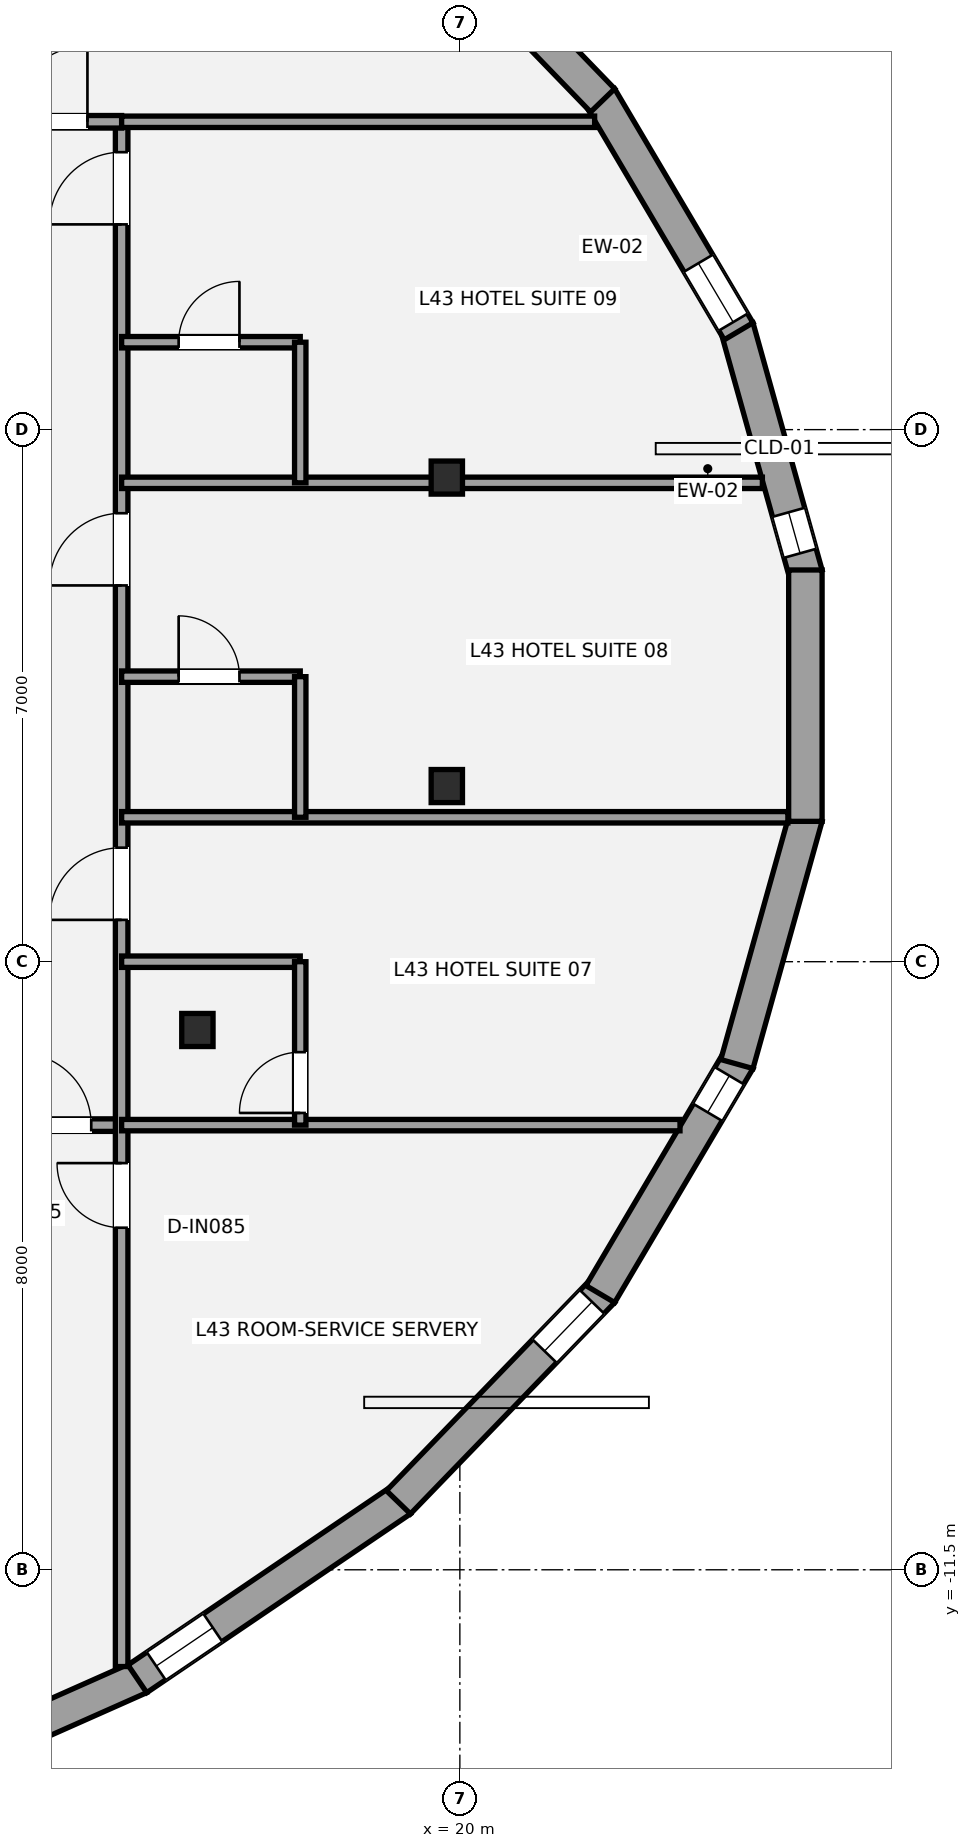
"""IFC4 building model, lengths in metres.
Left out: names, types, materials, properties, quantities, classifications, styles, units other than length and angle.
Written with IfcOpenShell. Run it as: python <this file> out.ifc"""

import sys

from ifc_helpers import new_model, si_unit, direction, frame, frame_2d, origin, origin_2d, place, context, subcontext, project, spatial, rectangle, i_section, extrude, element, fill, save


model = new_model("IFC4")
c1 = context("Model", 3, precision=1e-05, world=origin(), true_north=direction((0.0, 1.0)))
c2 = subcontext(c1, "Body", "Model", "MODEL_VIEW")
j1 = project(units=[si_unit("LENGTHUNIT", "METRE"), si_unit("PLANEANGLEUNIT", "RADIAN")], contexts=[c1])
p1 = place(None, origin())
s1 = spatial("IfcSite", under=j1, at=p1, CompositionType="ELEMENT")
p2 = place(p1, origin())
s2 = spatial("IfcBuilding", under=s1, at=p2, CompositionType="ELEMENT")
p3 = place(p2, frame((0.0, 0.0, 159.8)))
s3 = spatial("IfcBuildingStorey", under=s2, at=p3, CompositionType="ELEMENT", Elevation=159.8)
for number, where, z_axis, x_axis in (
    (1, (19.828, 2.869, 0.0), (0.0, 0.0, 1.0), (1.0, 0.0, 0.0)),
    (2, (16.547, -4.398, 0.0), (0.0, 0.0, 1.0), (1.0, 0.0, 0.0)),
    (3, (19.828, -1.189, 0.0), (0.0, 0.0, 1.0), (1.0, 0.0, 0.0)),
):
    element("IfcColumn", number, at=place(p3, frame(where, z_axis=z_axis, x_axis=x_axis)), inside=s3, PredefinedType="COLUMN", context=c2, shape_type="SweptSolid", body=[
        extrude(i_section(OverallWidth=0.412, OverallDepth=0.435, WebThickness=0.036, FlangeThickness=0.057, at=origin_2d()), origin(), (0.0, 0.0, 1.0), 3.2),
    ])
p4 = place(p3, frame((23.645, 4.846, 0.0), z_axis=(0.0, 0.0, 1.0), x_axis=(0.269235699479, -0.963074315993, 0.0)))
e4 = element("IfcWall", 4, at=p4, inside=s3, PredefinedType="STANDARD", context=c2, shape_type="SweptSolid", body=[
    extrude(rectangle(XDim=3.377, YDim=0.44, at=frame_2d((1.688, 0.0))), origin(), (0.0, 0.0, 1.0), 2.315),
])
p5 = place(p4, frame((2.528, 0.0, 0.58)))
e5 = element("IfcOpeningElement", 5, at=p5, cuts=e4, PredefinedType="OPENING", context=c2, shape_type="SweptSolid", body=[
    extrude(rectangle(XDim=0.56, YDim=1.15, at=frame_2d((0.28, 0.575))), frame((0.0, 0.23, 0.0), z_axis=(0.0, -1.0, 0.0), x_axis=(1.0, 0.0, 0.0)), (0.0, 0.0, 1.0), 0.46),
])
p6 = place(p3, frame((21.847, 7.873, 0.0), z_axis=(0.0, 0.0, 1.0), x_axis=(0.508883387051, -0.860835465338, 0.0)))
e6 = element("IfcWall", 6, at=p6, inside=s3, PredefinedType="STANDARD", context=c2, shape_type="SweptSolid", body=[
    extrude(rectangle(XDim=3.577, YDim=0.44, at=frame_2d((1.788, 0.0))), origin(), (0.0, 0.0, 1.0), 2.315),
])
p7 = place(p6, frame((2.537, 0.0, 0.42)))
e7 = element("IfcOpeningElement", 7, at=p7, cuts=e6, PredefinedType="OPENING", context=c2, shape_type="SweptSolid", body=[
    extrude(rectangle(XDim=0.9, YDim=1.35, at=frame_2d((0.45, 0.675))), frame((0.0, 0.23, 0.0), z_axis=(0.0, -1.0, 0.0), x_axis=(1.0, 0.0, 0.0)), (0.0, 0.0, 1.0), 0.46),
])
p8 = place(p3, frame((19.192, 10.612, 0.0), z_axis=(0.0, 0.0, 1.0), x_axis=(0.694975307772, -0.719033602544, 0.0)))
e8 = element("IfcWall", 8, at=p8, inside=s3, PredefinedType="STANDARD", context=c2, shape_type="SweptSolid", body=[
    extrude(rectangle(XDim=3.866, YDim=0.44, at=frame_2d((1.933, 0.0))), origin(), (0.0, 0.0, 1.0), 2.315),
])
p9 = place(p8, frame((0.25, 0.0, 0.42)))
e9 = element("IfcOpeningElement", 9, at=p9, cuts=e8, PredefinedType="OPENING", context=c2, shape_type="SweptSolid", body=[
    extrude(rectangle(XDim=0.9, YDim=1.35, at=frame_2d((0.45, 0.675))), frame((0.0, 0.23, 0.0), z_axis=(0.0, -1.0, 0.0), x_axis=(1.0, 0.0, 0.0)), (0.0, 0.0, 1.0), 0.46),
])
p10 = place(p3, frame((15.791, -12.916, 0.0), z_axis=(0.0, 0.0, 1.0), x_axis=(-0.913907994914, -0.405921392431, 0.0)))
e10 = element("IfcWall", 10, at=p10, inside=s3, PredefinedType="STANDARD", context=c2, shape_type="SweptSolid", body=[
    extrude(rectangle(XDim=4.487, YDim=0.44, at=frame_2d((2.244, 0.0))), origin(), (0.0, 0.0, 1.0), 2.315),
])
p11 = place(p10, frame((3.188, 0.0, 0.58)))
e11 = element("IfcOpeningElement", 11, at=p11, cuts=e10, PredefinedType="OPENING", context=c2, shape_type="SweptSolid", body=[
    extrude(rectangle(XDim=0.9, YDim=1.35, at=frame_2d((0.45, 0.675))), frame((0.0, 0.23, 0.0), z_axis=(0.0, -1.0, 0.0), x_axis=(1.0, 0.0, 0.0)), (0.0, 0.0, 1.0), 0.46),
])
p12 = place(p3, frame((19.227, -10.583, 0.0), z_axis=(0.0, 0.0, 1.0), x_axis=(-0.827760762475, -0.561081206338, 0.0)))
e12 = element("IfcWall", 12, at=p12, inside=s3, PredefinedType="STANDARD", context=c2, shape_type="SweptSolid", body=[
    extrude(rectangle(XDim=4.192, YDim=0.44, at=frame_2d((2.096, 0.0))), origin(), (0.0, 0.0, 1.0), 2.315),
])
p13 = place(p12, frame((2.992, 0.0, 0.58)))
e13 = element("IfcOpeningElement", 13, at=p13, cuts=e12, PredefinedType="OPENING", context=c2, shape_type="SweptSolid", body=[
    extrude(rectangle(XDim=0.9, YDim=1.35, at=frame_2d((0.45, 0.675))), frame((0.0, 0.23, 0.0), z_axis=(0.0, -1.0, 0.0), x_axis=(1.0, 0.0, 0.0)), (0.0, 0.0, 1.0), 0.46),
])
p14 = place(p3, frame((21.879, -7.832, 0.0), z_axis=(0.0, 0.0, 1.0), x_axis=(-0.694975307772, -0.719033602544, 0.0)))
e14 = element("IfcWall", 14, at=p14, inside=s3, PredefinedType="STANDARD", context=c2, shape_type="SweptSolid", body=[
    extrude(rectangle(XDim=3.866, YDim=0.44, at=frame_2d((1.933, 0.0))), origin(), (0.0, 0.0, 1.0), 2.315),
])
p15 = place(p14, frame((0.2, 0.0, 0.58)))
e15 = element("IfcOpeningElement", 15, at=p15, cuts=e14, PredefinedType="OPENING", context=c2, shape_type="SweptSolid", body=[
    extrude(rectangle(XDim=0.9, YDim=1.35, at=frame_2d((0.45, 0.675))), frame((0.0, 0.23, 0.0), z_axis=(0.0, -1.0, 0.0), x_axis=(1.0, 0.0, 0.0)), (0.0, 0.0, 1.0), 0.46),
])
p16 = place(p3, frame((23.667, -4.794, 0.0), z_axis=(0.0, 0.0, 1.0), x_axis=(-0.508883387051, -0.860835465338, 0.0)))
e16 = element("IfcWall", 16, at=p16, inside=s3, PredefinedType="STANDARD", context=c2, shape_type="SweptSolid", body=[
    extrude(rectangle(XDim=3.577, YDim=0.44, at=frame_2d((1.788, 0.0))), origin(), (0.0, 0.0, 1.0), 2.315),
])
p17 = place(p16, frame((0.24, 0.0, 0.58)))
e17 = element("IfcOpeningElement", 17, at=p17, cuts=e16, PredefinedType="OPENING", context=c2, shape_type="SweptSolid", body=[
    extrude(rectangle(XDim=0.56, YDim=1.15, at=frame_2d((0.28, 0.575))), frame((0.0, 0.23, 0.0), z_axis=(0.0, -1.0, 0.0), x_axis=(1.0, 0.0, 0.0)), (0.0, 0.0, 1.0), 0.46),
])
p18 = place(p3, frame((24.554, -1.594, 0.0), z_axis=(0.0, 0.0, 1.0), x_axis=(-0.269235699479, -0.963074315993, 0.0)))
e18 = element("IfcWall", 18, at=p18, inside=s3, PredefinedType="STANDARD", context=c2, shape_type="SweptSolid", body=[
    extrude(rectangle(XDim=3.377, YDim=0.44, at=frame_2d((1.688, 0.0))), origin(), (0.0, 0.0, 1.0), 2.315),
])
p19 = place(p3, frame((24.546, 1.654, 0.0), z_axis=(0.0, 0.0, 1.0), x_axis=(0.0, -1.0, 0.0)))
e19 = element("IfcWall", 19, at=p19, inside=s3, PredefinedType="STANDARD", context=c2, shape_type="SweptSolid", body=[
    extrude(rectangle(XDim=3.307, YDim=0.44, at=frame_2d((1.654, 0.0))), origin(), (0.0, 0.0, 1.0), 2.315),
])
p20 = place(p3, frame((-15.95, -5.65, 0.0), z_axis=(0.0, 0.0, 1.0), x_axis=(1.0, 0.0, 0.0)))
e20 = element("IfcWall", 20, at=p20, inside=s3, PredefinedType="PARTITIONING", context=c2, shape_type="SweptSolid", body=[
    extrude(rectangle(XDim=31.5, YDim=0.165, at=frame_2d((15.75, 0.0))), origin(), (0.0, 0.0, 1.0), 2.398),
])
p21 = place(p20, frame((4.8, 0.0, 0.0)))
e21 = element("IfcOpeningElement", 21, at=p21, cuts=e20, PredefinedType="OPENING", context=c2, shape_type="SweptSolid", body=[
    extrude(rectangle(XDim=0.95, YDim=2.15, at=frame_2d((0.475, 1.075))), frame((0.0, 0.093, 0.0), z_axis=(0.0, -1.0, 0.0), x_axis=(1.0, 0.0, 0.0)), (0.0, 0.0, 1.0), 0.185),
])
p22 = place(p20, frame((12.8, 0.0, 0.0)))
e22 = element("IfcOpeningElement", 22, at=p22, cuts=e20, PredefinedType="OPENING", context=c2, shape_type="SweptSolid", body=[
    extrude(rectangle(XDim=0.95, YDim=2.15, at=frame_2d((0.475, 1.075))), frame((0.0, 0.093, 0.0), z_axis=(0.0, -1.0, 0.0), x_axis=(1.0, 0.0, 0.0)), (0.0, 0.0, 1.0), 0.185),
])
p23 = place(p20, frame((20.8, 0.0, 0.0)))
e23 = element("IfcOpeningElement", 23, at=p23, cuts=e20, PredefinedType="OPENING", context=c2, shape_type="SweptSolid", body=[
    extrude(rectangle(XDim=0.95, YDim=2.15, at=frame_2d((0.475, 1.075))), frame((0.0, 0.093, 0.0), z_axis=(0.0, -1.0, 0.0), x_axis=(1.0, 0.0, 0.0)), (0.0, 0.0, 1.0), 0.185),
])
p24 = place(p20, frame((30.15, 0.0, 0.0)))
e24 = element("IfcOpeningElement", 24, at=p24, cuts=e20, PredefinedType="OPENING", context=c2, shape_type="SweptSolid", body=[
    extrude(rectangle(XDim=0.95, YDim=2.15, at=frame_2d((0.475, 1.075))), frame((0.0, 0.093, 0.0), z_axis=(0.0, -1.0, 0.0), x_axis=(1.0, 0.0, 0.0)), (0.0, 0.0, 1.0), 0.185),
])
p25 = place(p3, frame((15.55, -12.773, 0.0), z_axis=(0.0, 0.0, 1.0), x_axis=(0.0, 1.0, 0.0)))
e25 = element("IfcWall", 25, at=p25, inside=s3, PredefinedType="PARTITIONING", context=c2, shape_type="SweptSolid", body=[
    extrude(rectangle(XDim=20.323, YDim=0.165, at=frame_2d((10.162, 0.0))), origin(), (0.0, 0.0, 1.0), 2.473),
])
p26 = place(p25, frame((5.773, 0.0, 0.0)))
e26 = element("IfcOpeningElement", 26, at=p26, cuts=e25, PredefinedType="OPENING", context=c2, shape_type="SweptSolid", body=[
    extrude(rectangle(XDim=0.85, YDim=2.1, at=frame_2d((0.425, 1.05))), frame((0.0, 0.093, 0.0), z_axis=(0.0, -1.0, 0.0), x_axis=(1.0, 0.0, 0.0)), (0.0, 0.0, 1.0), 0.185),
])
p27 = place(p25, frame((9.823, 0.0, 0.0)))
e27 = element("IfcOpeningElement", 27, at=p27, cuts=e25, PredefinedType="OPENING", context=c2, shape_type="SweptSolid", body=[
    extrude(rectangle(XDim=0.95, YDim=2.15, at=frame_2d((0.475, 1.075))), frame((0.0, 0.093, 0.0), z_axis=(0.0, -1.0, 0.0), x_axis=(1.0, 0.0, 0.0)), (0.0, 0.0, 1.0), 0.185),
])
p28 = place(p25, frame((14.223, 0.0, 0.0)))
e28 = element("IfcOpeningElement", 28, at=p28, cuts=e25, PredefinedType="OPENING", context=c2, shape_type="SweptSolid", body=[
    extrude(rectangle(XDim=0.95, YDim=2.15, at=frame_2d((0.475, 1.075))), frame((0.0, 0.093, 0.0), z_axis=(0.0, -1.0, 0.0), x_axis=(1.0, 0.0, 0.0)), (0.0, 0.0, 1.0), 0.185),
])
p29 = place(p25, frame((18.973, 0.0, 0.0)))
e29 = element("IfcOpeningElement", 29, at=p29, cuts=e25, PredefinedType="OPENING", context=c2, shape_type="SweptSolid", body=[
    extrude(rectangle(XDim=0.95, YDim=2.15, at=frame_2d((0.475, 1.075))), frame((0.0, 0.093, 0.0), z_axis=(0.0, -1.0, 0.0), x_axis=(1.0, 0.0, 0.0)), (0.0, 0.0, 1.0), 0.185),
])
p30 = place(p3, frame((13.8, 7.55, 0.0), z_axis=(0.0, 0.0, 1.0), x_axis=(1.0, 0.0, 0.0)))
e30 = element("IfcWall", 30, at=p30, inside=s3, PredefinedType="PARTITIONING", context=c2, shape_type="SweptSolid", body=[
    extrude(rectangle(XDim=1.75, YDim=0.165, at=frame_2d((0.875, 0.0))), origin(), (0.0, 0.0, 1.0), 2.473),
])
p31 = place(p30, frame((0.3, 0.0, 0.0)))
e31 = element("IfcOpeningElement", 31, at=p31, cuts=e30, PredefinedType="OPENING", context=c2, shape_type="SweptSolid", body=[
    extrude(rectangle(XDim=1.0, YDim=2.15, at=frame_2d((0.5, 1.075))), frame((0.0, 0.093, 0.0), z_axis=(0.0, -1.0, 0.0), x_axis=(1.0, 0.0, 0.0)), (0.0, 0.0, 1.0), 0.185),
])
p32 = place(p3, frame((15.55, 7.55, 0.0), z_axis=(0.0, 0.0, 1.0), x_axis=(1.0, 0.0, 0.0)))
e32 = element("IfcWall", 32, at=p32, inside=s3, PredefinedType="PLUMBINGWALL", context=c2, shape_type="SweptSolid", body=[
    extrude(rectangle(XDim=6.223, YDim=0.15, at=frame_2d((3.112, 0.0))), origin(), (0.0, 0.0, 1.0), 2.473),
])
p33 = place(p3, frame((15.55, -5.65, 0.0), z_axis=(0.0, 0.0, 1.0), x_axis=(1.0, 0.0, 0.0)))
e33 = element("IfcWall", 33, at=p33, inside=s3, PredefinedType="PLUMBINGWALL", context=c2, shape_type="SweptSolid", body=[
    extrude(rectangle(XDim=7.346, YDim=0.15, at=frame_2d((3.673, 0.0))), origin(), (0.0, 0.0, 1.0), 2.473),
])
p34 = place(p3, frame((15.55, -1.6, 0.0), z_axis=(0.0, 0.0, 1.0), x_axis=(1.0, 0.0, 0.0)))
e34 = element("IfcWall", 34, at=p34, inside=s3, PredefinedType="PLUMBINGWALL", context=c2, shape_type="SweptSolid", body=[
    extrude(rectangle(XDim=8.766, YDim=0.15, at=frame_2d((4.383, 0.0))), origin(), (0.0, 0.0, 1.0), 2.398),
])
p35 = place(p3, frame((15.55, 2.8, 0.0), z_axis=(0.0, 0.0, 1.0), x_axis=(1.0, 0.0, 0.0)))
e35 = element("IfcWall", 35, at=p35, inside=s3, PredefinedType="PLUMBINGWALL", context=c2, shape_type="SweptSolid", body=[
    extrude(rectangle(XDim=8.43, YDim=0.15, at=frame_2d((4.215, 0.0))), origin(), (0.0, 0.0, 1.0), 2.473),
])
p36 = place(p3, frame((15.55, -3.5, 0.0), z_axis=(0.0, 0.0, 1.0), x_axis=(1.0, 0.0, 0.0)))
e36 = element("IfcWall", 36, at=p36, inside=s3, PredefinedType="PLUMBINGWALL", context=c2, shape_type="SweptSolid", body=[
    extrude(rectangle(XDim=2.35, YDim=0.15, at=frame_2d((1.175, 0.0))), origin(), (0.0, 0.0, 1.0), 2.398),
])
p37 = place(p3, frame((17.9, -5.65, 0.0), z_axis=(0.0, 0.0, 1.0), x_axis=(0.0, 1.0, 0.0)))
e37 = element("IfcWall", 37, at=p37, inside=s3, PredefinedType="PLUMBINGWALL", context=c2, shape_type="SweptSolid", body=[
    extrude(rectangle(XDim=2.15, YDim=0.15, at=frame_2d((1.075, 0.0))), origin(), (0.0, 0.0, 1.0), 3.02),
])
p38 = place(p37, frame((0.16, 0.0, 0.0)))
e38 = element("IfcOpeningElement", 38, at=p38, cuts=e37, PredefinedType="OPENING", context=c2, shape_type="SweptSolid", body=[
    extrude(rectangle(XDim=0.8, YDim=2.1, at=frame_2d((0.4, 1.05))), frame((0.0, 0.085, 0.0), z_axis=(0.0, -1.0, 0.0), x_axis=(1.0, 0.0, 0.0)), (0.0, 0.0, 1.0), 0.17),
])
p39 = place(p3, frame((15.55, 0.25, 0.0), z_axis=(0.0, 0.0, 1.0), x_axis=(1.0, 0.0, 0.0)))
e39 = element("IfcWall", 39, at=p39, inside=s3, PredefinedType="PLUMBINGWALL", context=c2, shape_type="SweptSolid", body=[
    extrude(rectangle(XDim=2.35, YDim=0.15, at=frame_2d((1.175, 0.0))), origin(), (0.0, 0.0, 1.0), 2.473),
])
p40 = place(p39, frame((0.75, 0.0, 0.0)))
e40 = element("IfcOpeningElement", 40, at=p40, cuts=e39, PredefinedType="OPENING", context=c2, shape_type="SweptSolid", body=[
    extrude(rectangle(XDim=0.8, YDim=2.1, at=frame_2d((0.4, 1.05))), frame((0.0, 0.085, 0.0), z_axis=(0.0, -1.0, 0.0), x_axis=(1.0, 0.0, 0.0)), (0.0, 0.0, 1.0), 0.17),
])
p41 = place(p3, frame((17.9, -1.6, 0.0), z_axis=(0.0, 0.0, 1.0), x_axis=(0.0, 1.0, 0.0)))
e41 = element("IfcWall", 41, at=p41, inside=s3, PredefinedType="PLUMBINGWALL", context=c2, shape_type="SweptSolid", body=[
    extrude(rectangle(XDim=1.85, YDim=0.15, at=frame_2d((0.925, 0.0))), origin(), (0.0, 0.0, 1.0), 3.02),
])
p42 = place(p3, frame((15.55, 4.65, 0.0), z_axis=(0.0, 0.0, 1.0), x_axis=(1.0, 0.0, 0.0)))
e42 = element("IfcWall", 42, at=p42, inside=s3, PredefinedType="PLUMBINGWALL", context=c2, shape_type="SweptSolid", body=[
    extrude(rectangle(XDim=2.35, YDim=0.15, at=frame_2d((1.175, 0.0))), origin(), (0.0, 0.0, 1.0), 2.473),
])
p43 = place(p42, frame((0.75, 0.0, 0.0)))
e43 = element("IfcOpeningElement", 43, at=p43, cuts=e42, PredefinedType="OPENING", context=c2, shape_type="SweptSolid", body=[
    extrude(rectangle(XDim=0.8, YDim=2.1, at=frame_2d((0.4, 1.05))), frame((0.0, 0.085, 0.0), z_axis=(0.0, -1.0, 0.0), x_axis=(1.0, 0.0, 0.0)), (0.0, 0.0, 1.0), 0.17),
])
p44 = place(p3, frame((17.9, 2.8, 0.0), z_axis=(0.0, 0.0, 1.0), x_axis=(0.0, 1.0, 0.0)))
e44 = element("IfcWall", 44, at=p44, inside=s3, PredefinedType="PLUMBINGWALL", context=c2, shape_type="SweptSolid", body=[
    extrude(rectangle(XDim=1.85, YDim=0.15, at=frame_2d((0.925, 0.0))), origin(), (0.0, 0.0, 1.0), 2.473),
])
p45 = place(p13, origin())
e45 = element("IfcWindow", 45, at=p45, inside=s3, PartitioningType="SINGLE_PANEL", PredefinedType="WINDOW", context=c2, shape_type="SweptSolid", body=[
    extrude(rectangle(XDim=0.9, YDim=1.35, at=frame_2d((0.45, 0.675))), frame((0.0, -0.01, 0.0), z_axis=(0.0, -1.0, 0.0), x_axis=(1.0, 0.0, 0.0)), (0.0, 0.0, 1.0), 0.06),
])
fill(e13, e45)
p46 = place(p15, origin())
e46 = element("IfcWindow", 46, at=p46, inside=s3, PartitioningType="SINGLE_PANEL", PredefinedType="WINDOW", context=c2, shape_type="SweptSolid", body=[
    extrude(rectangle(XDim=0.9, YDim=1.35, at=frame_2d((0.45, 0.675))), frame((0.0, -0.01, 0.0), z_axis=(0.0, -1.0, 0.0), x_axis=(1.0, 0.0, 0.0)), (0.0, 0.0, 1.0), 0.06),
])
fill(e15, e46)
p47 = place(p17, origin())
e47 = element("IfcWindow", 47, at=p47, inside=s3, PartitioningType="SINGLE_PANEL", PredefinedType="WINDOW", context=c2, shape_type="SweptSolid", body=[
    extrude(rectangle(XDim=0.56, YDim=1.15, at=frame_2d((0.28, 0.575))), frame((0.0, -0.01, 0.0), z_axis=(0.0, -1.0, 0.0), x_axis=(1.0, 0.0, 0.0)), (0.0, 0.0, 1.0), 0.06),
])
fill(e17, e47)
p48 = place(p5, origin())
e48 = element("IfcWindow", 48, at=p48, inside=s3, PartitioningType="SINGLE_PANEL", PredefinedType="WINDOW", context=c2, shape_type="SweptSolid", body=[
    extrude(rectangle(XDim=0.56, YDim=1.15, at=frame_2d((0.28, 0.575))), frame((0.0, -0.01, 0.0), z_axis=(0.0, -1.0, 0.0), x_axis=(1.0, 0.0, 0.0)), (0.0, 0.0, 1.0), 0.06),
])
fill(e5, e48)
p49 = place(p7, origin())
e49 = element("IfcWindow", 49, at=p49, inside=s3, PartitioningType="SINGLE_PANEL", PredefinedType="WINDOW", context=c2, shape_type="SweptSolid", body=[
    extrude(rectangle(XDim=0.9, YDim=1.35, at=frame_2d((0.45, 0.675))), frame((0.0, -0.01, 0.0), z_axis=(0.0, -1.0, 0.0), x_axis=(1.0, 0.0, 0.0)), (0.0, 0.0, 1.0), 0.06),
])
fill(e7, e49)
p50 = place(p31, origin())
e50 = element("IfcDoor", 50, at=p50, inside=s3, OperationType="SINGLE_SWING_RIGHT", PredefinedType="DOOR", context=c2, shape_type="SweptSolid", body=[
    extrude(rectangle(XDim=1.0, YDim=2.15, at=frame_2d((0.5, 1.075))), frame((0.0, 0.025, 0.0), z_axis=(0.0, -1.0, 0.0), x_axis=(1.0, 0.0, 0.0)), (0.0, 0.0, 1.0), 0.05),
])
fill(e31, e50)
p51 = place(p26, origin())
e51 = element("IfcDoor", 51, at=p51, inside=s3, OperationType="SINGLE_SWING_RIGHT", PredefinedType="DOOR", context=c2, shape_type="SweptSolid", body=[
    extrude(rectangle(XDim=0.85, YDim=2.1, at=frame_2d((0.425, 1.05))), frame((0.0, 0.025, 0.0), z_axis=(0.0, -1.0, 0.0), x_axis=(1.0, 0.0, 0.0)), (0.0, 0.0, 1.0), 0.05),
])
fill(e26, e51)
p52 = place(p24, origin())
e52 = element("IfcDoor", 52, at=p52, inside=s3, OperationType="SINGLE_SWING_LEFT", PredefinedType="DOOR", context=c2, shape_type="SweptSolid", body=[
    extrude(rectangle(XDim=0.95, YDim=2.15, at=frame_2d((0.475, 1.075))), frame((0.0, 0.025, 0.0), z_axis=(0.0, -1.0, 0.0), x_axis=(1.0, 0.0, 0.0)), (0.0, 0.0, 1.0), 0.05),
])
fill(e24, e52)
p53 = place(p27, origin())
e53 = element("IfcDoor", 53, at=p53, inside=s3, OperationType="SINGLE_SWING_LEFT", PredefinedType="DOOR", context=c2, shape_type="SweptSolid", body=[
    extrude(rectangle(XDim=0.95, YDim=2.15, at=frame_2d((0.475, 1.075))), frame((0.0, 0.025, 0.0), z_axis=(0.0, -1.0, 0.0), x_axis=(1.0, 0.0, 0.0)), (0.0, 0.0, 1.0), 0.05),
])
fill(e27, e53)
p54 = place(p38, origin())
e54 = element("IfcDoor", 54, at=p54, inside=s3, OperationType="SINGLE_SWING_LEFT", PredefinedType="DOOR", context=c2, shape_type="SweptSolid", body=[
    extrude(rectangle(XDim=0.8, YDim=2.1, at=frame_2d((0.4, 1.05))), frame((0.0, 0.025, 0.0), z_axis=(0.0, -1.0, 0.0), x_axis=(1.0, 0.0, 0.0)), (0.0, 0.0, 1.0), 0.05),
])
fill(e38, e54)
p55 = place(p28, origin())
e55 = element("IfcDoor", 55, at=p55, inside=s3, OperationType="SINGLE_SWING_LEFT", PredefinedType="DOOR", context=c2, shape_type="SweptSolid", body=[
    extrude(rectangle(XDim=0.95, YDim=2.15, at=frame_2d((0.475, 1.075))), frame((0.0, 0.025, 0.0), z_axis=(0.0, -1.0, 0.0), x_axis=(1.0, 0.0, 0.0)), (0.0, 0.0, 1.0), 0.05),
])
fill(e28, e55)
p56 = place(p40, origin())
e56 = element("IfcDoor", 56, at=p56, inside=s3, OperationType="SINGLE_SWING_LEFT", PredefinedType="DOOR", context=c2, shape_type="SweptSolid", body=[
    extrude(rectangle(XDim=0.8, YDim=2.1, at=frame_2d((0.4, 1.05))), frame((0.0, 0.025, 0.0), z_axis=(0.0, -1.0, 0.0), x_axis=(1.0, 0.0, 0.0)), (0.0, 0.0, 1.0), 0.05),
])
fill(e40, e56)
p57 = place(p29, origin())
e57 = element("IfcDoor", 57, at=p57, inside=s3, OperationType="SINGLE_SWING_LEFT", PredefinedType="DOOR", context=c2, shape_type="SweptSolid", body=[
    extrude(rectangle(XDim=0.95, YDim=2.15, at=frame_2d((0.475, 1.075))), frame((0.0, 0.025, 0.0), z_axis=(0.0, -1.0, 0.0), x_axis=(1.0, 0.0, 0.0)), (0.0, 0.0, 1.0), 0.05),
])
fill(e29, e57)
p58 = place(p43, origin())
e58 = element("IfcDoor", 58, at=p58, inside=s3, OperationType="SINGLE_SWING_RIGHT", PredefinedType="DOOR", context=c2, shape_type="SweptSolid", body=[
    extrude(rectangle(XDim=0.8, YDim=2.1, at=frame_2d((0.4, 1.05))), frame((0.0, 0.025, 0.0), z_axis=(0.0, -1.0, 0.0), x_axis=(1.0, 0.0, 0.0)), (0.0, 0.0, 1.0), 0.05),
])
fill(e43, e58)
save(model, sys.argv[1])
